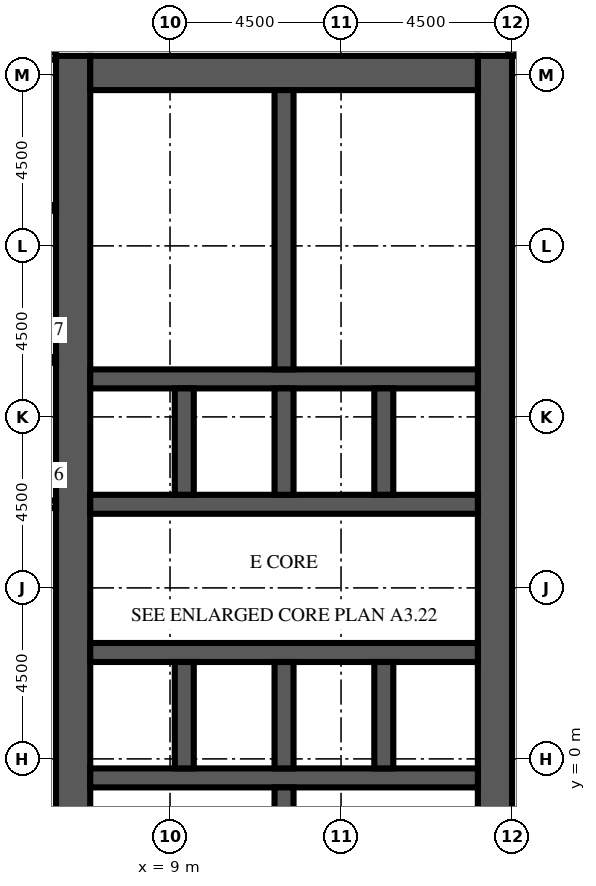
"""IFC4 building model, lengths in metres.
Left out: names, types, materials, properties, quantities, classifications, styles, units other than length and angle.
Written with IfcOpenShell. Run it as: python <this file> out.ifc"""

import sys

from ifc_helpers import new_model, si_unit, direction, frame, frame_2d, origin, place, context, subcontext, project, spatial, rectangle, extrude, element, fill, save


model = new_model("IFC4")
c1 = context("Model", 3, precision=1e-05, world=origin(), true_north=direction((0.0, 1.0)))
c2 = subcontext(c1, "Body", "Model", "MODEL_VIEW")
j1 = project(units=[si_unit("LENGTHUNIT", "METRE"), si_unit("PLANEANGLEUNIT", "RADIAN")], contexts=[c1])
p1 = place(None, origin())
s1 = spatial("IfcSite", under=j1, at=p1, CompositionType="ELEMENT")
p2 = place(p1, origin())
s2 = spatial("IfcBuilding", under=s1, at=p2, CompositionType="ELEMENT")
p3 = place(p2, frame((0.0, 0.0, 141.3)))
s3 = spatial("IfcBuildingStorey", under=s2, at=p3, CompositionType="ELEMENT", Elevation=141.3)
p4 = place(p3, frame((6.45, -9.0, 0.0), z_axis=(0.0, 0.0, 1.0), x_axis=(0.0, 1.0, 0.0)))
e1 = element("IfcWall", 1, at=p4, inside=s3, PredefinedType="SHEAR", context=c2, shape_type="SweptSolid", body=[
    extrude(rectangle(XDim=27.5, YDim=0.9, at=frame_2d((13.75, 0.0))), origin(), (0.0, 0.0, 1.0), 4.1),
])
p5 = place(p4, frame((12.55, 0.0, 0.0)))
e2 = element("IfcOpeningElement", 2, at=p5, cuts=e1, PredefinedType="OPENING", context=c2, shape_type="SweptSolid", body=[
    extrude(rectangle(XDim=2.4, YDim=2.4, at=frame_2d((1.2, 1.2))), frame((0.0, 0.46, 0.0), z_axis=(0.0, -1.0, 0.0), x_axis=(1.0, 0.0, 0.0)), (0.0, 0.0, 1.0), 0.92),
])
p6 = place(p4, frame((5.51, 0.0, 0.0)))
e3 = element("IfcOpeningElement", 3, at=p6, cuts=e1, PredefinedType="OPENING", context=c2, shape_type="SweptSolid", body=[
    extrude(rectangle(XDim=0.923, YDim=2.1, at=frame_2d((0.461, 1.05))), frame((0.0, 0.46, 0.0), z_axis=(0.0, -1.0, 0.0), x_axis=(1.0, 0.0, 0.0)), (0.0, 0.0, 1.0), 0.92),
])
p7 = place(p4, frame((23.427, 0.0, 0.0)))
e4 = element("IfcOpeningElement", 4, at=p7, cuts=e1, PredefinedType="OPENING", context=c2, shape_type="SweptSolid", body=[
    extrude(rectangle(XDim=1.2, YDim=2.1, at=frame_2d((0.6, 1.05))), frame((0.0, 0.46, 0.0), z_axis=(0.0, -1.0, 0.0), x_axis=(1.0, 0.0, 0.0)), (0.0, 0.0, 1.0), 0.92),
])
p8 = place(p3, frame((17.55, -9.0, 0.0), z_axis=(0.0, 0.0, 1.0), x_axis=(0.0, 1.0, 0.0)))
e5 = element("IfcWall", 5, at=p8, inside=s3, PredefinedType="SHEAR", context=c2, shape_type="SweptSolid", body=[
    extrude(rectangle(XDim=27.5, YDim=0.9, at=frame_2d((13.75, 0.0))), origin(), (0.0, 0.0, 1.0), 4.1),
])
p9 = place(p8, frame((12.55, 0.0, 0.0)))
e6 = element("IfcOpeningElement", 6, at=p9, cuts=e5, PredefinedType="OPENING", context=c2, shape_type="SweptSolid", body=[
    extrude(rectangle(XDim=2.4, YDim=2.4, at=frame_2d((1.2, 1.2))), frame((0.0, 0.46, 0.0), z_axis=(0.0, -1.0, 0.0), x_axis=(1.0, 0.0, 0.0)), (0.0, 0.0, 1.0), 0.92),
])
p10 = place(p8, frame((6.825, 0.0, 0.0)))
e7 = element("IfcOpeningElement", 7, at=p10, cuts=e5, PredefinedType="OPENING", context=c2, shape_type="SweptSolid", body=[
    extrude(rectangle(XDim=1.2, YDim=2.1, at=frame_2d((0.6, 1.05))), frame((0.0, 0.46, 0.0), z_axis=(0.0, -1.0, 0.0), x_axis=(1.0, 0.0, 0.0)), (0.0, 0.0, 1.0), 0.92),
])
p11 = place(p8, frame((19.475, 0.0, 0.0)))
e8 = element("IfcOpeningElement", 8, at=p11, cuts=e5, PredefinedType="OPENING", context=c2, shape_type="SweptSolid", body=[
    extrude(rectangle(XDim=1.2, YDim=2.1, at=frame_2d((0.6, 1.05))), frame((0.0, 0.46, 0.0), z_axis=(0.0, -1.0, 0.0), x_axis=(1.0, 0.0, 0.0)), (0.0, 0.0, 1.0), 0.92),
])
p12 = place(p3, frame((6.9, 18.05, 0.0), z_axis=(0.0, 0.0, 1.0), x_axis=(1.0, 0.0, 0.0)))
e9 = element("IfcWall", 9, at=p12, inside=s3, PredefinedType="SHEAR", context=c2, shape_type="SweptSolid", body=[
    extrude(rectangle(XDim=10.2, YDim=0.9, at=frame_2d((5.1, 0.0))), origin(), (0.0, 0.0, 1.0), 4.1),
])
p13 = place(p3, frame((6.9, -0.5, 0.0), z_axis=(0.0, 0.0, 1.0), x_axis=(1.0, 0.0, 0.0)))
e10 = element("IfcWall", 10, at=p13, inside=s3, PredefinedType="SHEAR", context=c2, shape_type="SweptSolid", body=[
    extrude(rectangle(XDim=10.2, YDim=0.5, at=frame_2d((5.1, 0.0))), origin(), (0.0, 0.0, 1.0), 4.1),
])
p14 = place(p3, frame((6.9, 2.8, 0.0), z_axis=(0.0, 0.0, 1.0), x_axis=(1.0, 0.0, 0.0)))
e11 = element("IfcWall", 11, at=p14, inside=s3, PredefinedType="SHEAR", context=c2, shape_type="SweptSolid", body=[
    extrude(rectangle(XDim=10.2, YDim=0.5, at=frame_2d((5.1, 0.0))), origin(), (0.0, 0.0, 1.0), 4.1),
])
p15 = place(p14, frame((0.562, 0.0, 0.0)))
e12 = element("IfcOpeningElement", 12, at=p15, cuts=e11, PredefinedType="OPENING", context=c2, shape_type="SweptSolid", body=[
    extrude(rectangle(XDim=1.1, YDim=2.1, at=frame_2d((0.55, 1.05))), frame((0.0, 0.26, 0.0), z_axis=(0.0, -1.0, 0.0), x_axis=(1.0, 0.0, 0.0)), (0.0, 0.0, 1.0), 0.52),
])
p16 = place(p14, frame((3.238, 0.0, 0.0)))
e13 = element("IfcOpeningElement", 13, at=p16, cuts=e11, PredefinedType="OPENING", context=c2, shape_type="SweptSolid", body=[
    extrude(rectangle(XDim=1.1, YDim=2.1, at=frame_2d((0.55, 1.05))), frame((0.0, 0.26, 0.0), z_axis=(0.0, -1.0, 0.0), x_axis=(1.0, 0.0, 0.0)), (0.0, 0.0, 1.0), 0.52),
])
p17 = place(p14, frame((8.538, 0.0, 0.0)))
e14 = element("IfcOpeningElement", 14, at=p17, cuts=e11, PredefinedType="OPENING", context=c2, shape_type="SweptSolid", body=[
    extrude(rectangle(XDim=1.1, YDim=2.1, at=frame_2d((0.55, 1.05))), frame((0.0, 0.26, 0.0), z_axis=(0.0, -1.0, 0.0), x_axis=(1.0, 0.0, 0.0)), (0.0, 0.0, 1.0), 0.52),
])
p18 = place(p3, frame((6.9, 6.7, 0.0), z_axis=(0.0, 0.0, 1.0), x_axis=(1.0, 0.0, 0.0)))
e15 = element("IfcWall", 15, at=p18, inside=s3, PredefinedType="SHEAR", context=c2, shape_type="SweptSolid", body=[
    extrude(rectangle(XDim=10.2, YDim=0.5, at=frame_2d((5.1, 0.0))), origin(), (0.0, 0.0, 1.0), 4.1),
])
p19 = place(p18, frame((0.562, 0.0, 0.0)))
e16 = element("IfcOpeningElement", 16, at=p19, cuts=e15, PredefinedType="OPENING", context=c2, shape_type="SweptSolid", body=[
    extrude(rectangle(XDim=1.1, YDim=2.1, at=frame_2d((0.55, 1.05))), frame((0.0, 0.26, 0.0), z_axis=(0.0, -1.0, 0.0), x_axis=(1.0, 0.0, 0.0)), (0.0, 0.0, 1.0), 0.52),
])
p20 = place(p18, frame((3.288, 0.0, 0.0)))
e17 = element("IfcOpeningElement", 17, at=p20, cuts=e15, PredefinedType="OPENING", context=c2, shape_type="SweptSolid", body=[
    extrude(rectangle(XDim=1.0, YDim=2.1, at=frame_2d((0.5, 1.05))), frame((0.0, 0.26, 0.0), z_axis=(0.0, -1.0, 0.0), x_axis=(1.0, 0.0, 0.0)), (0.0, 0.0, 1.0), 0.52),
])
p21 = place(p18, frame((5.913, 0.0, 0.0)))
e18 = element("IfcOpeningElement", 18, at=p21, cuts=e15, PredefinedType="OPENING", context=c2, shape_type="SweptSolid", body=[
    extrude(rectangle(XDim=1.0, YDim=2.1, at=frame_2d((0.5, 1.05))), frame((0.0, 0.26, 0.0), z_axis=(0.0, -1.0, 0.0), x_axis=(1.0, 0.0, 0.0)), (0.0, 0.0, 1.0), 0.52),
])
p22 = place(p18, frame((8.587, 0.0, 0.0)))
e19 = element("IfcOpeningElement", 19, at=p22, cuts=e15, PredefinedType="OPENING", context=c2, shape_type="SweptSolid", body=[
    extrude(rectangle(XDim=1.0, YDim=2.1, at=frame_2d((0.5, 1.05))), frame((0.0, 0.26, 0.0), z_axis=(0.0, -1.0, 0.0), x_axis=(1.0, 0.0, 0.0)), (0.0, 0.0, 1.0), 0.52),
])
p23 = place(p3, frame((6.9, 10.0, 0.0), z_axis=(0.0, 0.0, 1.0), x_axis=(1.0, 0.0, 0.0)))
e20 = element("IfcWall", 20, at=p23, inside=s3, PredefinedType="SHEAR", context=c2, shape_type="SweptSolid", body=[
    extrude(rectangle(XDim=10.2, YDim=0.5, at=frame_2d((5.1, 0.0))), origin(), (0.0, 0.0, 1.0), 4.1),
])
for number, where, z_axis, x_axis in (
    (21, (9.375, -0.25, 0.0), (0.0, 0.0, 1.0), (0.0, 1.0, 0.0)),
    (22, (9.375, 6.95, 0.0), (0.0, 0.0, 1.0), (0.0, 1.0, 0.0)),
    (23, (12.0, -0.25, 0.0), (0.0, 0.0, 1.0), (0.0, 1.0, 0.0)),
    (24, (12.0, 6.95, 0.0), (0.0, 0.0, 1.0), (0.0, 1.0, 0.0)),
    (25, (14.625, -0.25, 0.0), (0.0, 0.0, 1.0), (0.0, 1.0, 0.0)),
    (26, (14.625, 6.95, 0.0), (0.0, 0.0, 1.0), (0.0, 1.0, 0.0)),
):
    element("IfcWall", number, at=place(p3, frame(where, z_axis=z_axis, x_axis=x_axis)), inside=s3, PredefinedType="SHEAR", context=c2, shape_type="SweptSolid", body=[
        extrude(rectangle(XDim=2.8, YDim=0.5, at=frame_2d((1.4, 0.0))), origin(), (0.0, 0.0, 1.0), 4.1),
    ])
for number, where, z_axis, x_axis in (
    (27, (12.0, -8.1, 0.0), (0.0, 0.0, 1.0), (0.0, 1.0, 0.0)),
    (28, (12.0, 10.25, 0.0), (0.0, 0.0, 1.0), (0.0, 1.0, 0.0)),
):
    element("IfcWall", number, at=place(p3, frame(where, z_axis=z_axis, x_axis=x_axis)), inside=s3, PredefinedType="SHEAR", context=c2, shape_type="SweptSolid", body=[
        extrude(rectangle(XDim=7.35, YDim=0.5, at=frame_2d((3.675, 0.0))), origin(), (0.0, 0.0, 1.0), 4.1),
    ])
p24 = place(p3, frame((9.325, -2.367, 0.0), z_axis=(0.0, 0.0, 1.0), x_axis=(0.0, 1.0, 0.0)))
e29 = element("IfcWall", 29, at=p24, inside=s3, PredefinedType="PARTITIONING", context=c2, shape_type="SweptSolid", body=[
    extrude(rectangle(XDim=1.617, YDim=0.1, at=frame_2d((0.809, 0.0))), origin(), (0.0, 0.0, 1.0), 3.5),
])
p25 = place(p3, frame((6.9, 12.455, 0.0), z_axis=(0.0, 0.0, 1.0), x_axis=(1.0, 0.0, 0.0)))
e30 = element("IfcWall", 30, at=p25, inside=s3, PredefinedType="PARTITIONING", context=c2, shape_type="SweptSolid", body=[
    extrude(rectangle(XDim=1.3, YDim=0.1, at=frame_2d((0.65, 0.0))), origin(), (0.0, 0.0, 1.0), 3.5),
])
p26 = place(p25, frame((0.2, 0.0, 0.0)))
e31 = element("IfcOpeningElement", 31, at=p26, cuts=e30, PredefinedType="OPENING", context=c2, shape_type="SweptSolid", body=[
    extrude(rectangle(XDim=0.9, YDim=2.1, at=frame_2d((0.45, 1.05))), frame((0.0, 0.06, 0.0), z_axis=(0.0, -1.0, 0.0), x_axis=(1.0, 0.0, 0.0)), (0.0, 0.0, 1.0), 0.12),
])
p27 = place(p3, frame((8.2, 12.455, 0.0), z_axis=(0.0, 0.0, 1.0), x_axis=(1.0, 0.0, 0.0)))
e32 = element("IfcWall", 32, at=p27, inside=s3, PredefinedType="PARTITIONING", context=c2, shape_type="SweptSolid", body=[
    extrude(rectangle(XDim=3.55, YDim=0.1, at=frame_2d((1.775, 0.0))), origin(), (0.0, 0.0, 1.0), 3.5),
])
p28 = place(p3, frame((8.2, 12.455, 0.0), z_axis=(0.0, 0.0, 1.0), x_axis=(0.0, 1.0, 0.0)))
e33 = element("IfcWall", 33, at=p28, inside=s3, PredefinedType="PARTITIONING", context=c2, shape_type="SweptSolid", body=[
    extrude(rectangle(XDim=2.573, YDim=0.1, at=frame_2d((1.286, 0.0))), origin(), (0.0, 0.0, 1.0), 3.5),
])
p29 = place(p28, frame((0.786, 0.0, 0.0)))
e34 = element("IfcOpeningElement", 34, at=p29, cuts=e33, PredefinedType="OPENING", context=c2, shape_type="SweptSolid", body=[
    extrude(rectangle(XDim=1.0, YDim=2.1, at=frame_2d((0.5, 1.05))), frame((0.0, 0.06, 0.0), z_axis=(0.0, -1.0, 0.0), x_axis=(1.0, 0.0, 0.0)), (0.0, 0.0, 1.0), 0.12),
])
p30 = place(p3, frame((8.2, 15.028, 0.0), z_axis=(0.0, 0.0, 1.0), x_axis=(0.0, 1.0, 0.0)))
e35 = element("IfcWall", 35, at=p30, inside=s3, PredefinedType="PARTITIONING", context=c2, shape_type="SweptSolid", body=[
    extrude(rectangle(XDim=2.573, YDim=0.1, at=frame_2d((1.286, 0.0))), origin(), (0.0, 0.0, 1.0), 3.5),
])
p31 = place(p30, frame((0.786, 0.0, 0.0)))
e36 = element("IfcOpeningElement", 36, at=p31, cuts=e35, PredefinedType="OPENING", context=c2, shape_type="SweptSolid", body=[
    extrude(rectangle(XDim=1.0, YDim=2.1, at=frame_2d((0.5, 1.05))), frame((0.0, 0.06, 0.0), z_axis=(0.0, -1.0, 0.0), x_axis=(1.0, 0.0, 0.0)), (0.0, 0.0, 1.0), 0.12),
])
p32 = place(p3, frame((8.2, 15.028, 0.0), z_axis=(0.0, 0.0, 1.0), x_axis=(1.0, 0.0, 0.0)))
e37 = element("IfcWall", 37, at=p32, inside=s3, PredefinedType="PARTITIONING", context=c2, shape_type="SweptSolid", body=[
    extrude(rectangle(XDim=3.55, YDim=0.1, at=frame_2d((1.775, 0.0))), origin(), (0.0, 0.0, 1.0), 3.5),
])
p33 = place(p3, frame((18.0, 18.5, 0.0), z_axis=(0.0, 0.0, 1.0), x_axis=(0.0, 1.0, 0.0)))
e38 = element("IfcWall", 38, at=p33, inside=s3, PredefinedType="PARTITIONING", context=c2, shape_type="SweptSolid", body=[
    extrude(rectangle(XDim=3.3, YDim=0.2, at=frame_2d((1.65, 0.0))), origin(), (0.0, 0.0, 1.0), 3.5),
])
p34 = place(p3, frame((1.5, 6.7, 0.0), z_axis=(0.0, 0.0, 1.0), x_axis=(1.0, 0.0, 0.0)))
e39 = element("IfcWall", 39, at=p34, inside=s3, PredefinedType="PARTITIONING", context=c2, shape_type="SweptSolid", body=[
    extrude(rectangle(XDim=4.5, YDim=0.2, at=frame_2d((2.25, 0.0))), origin(), (0.0, 0.0, 1.0), 3.5),
])
p35 = place(p34, frame((2.35, 0.0, 0.0)))
e40 = element("IfcOpeningElement", 40, at=p35, cuts=e39, PredefinedType="OPENING", context=c2, shape_type="SweptSolid", body=[
    extrude(rectangle(XDim=1.0, YDim=2.1, at=frame_2d((0.5, 1.05))), frame((0.0, 0.11, 0.0), z_axis=(0.0, -1.0, 0.0), x_axis=(1.0, 0.0, 0.0)), (0.0, 0.0, 1.0), 0.22),
])
p36 = place(p3, frame((1.5, 10.5, 0.0), z_axis=(0.0, 0.0, 1.0), x_axis=(1.0, 0.0, 0.0)))
e41 = element("IfcWall", 41, at=p36, inside=s3, PredefinedType="PARTITIONING", context=c2, shape_type="SweptSolid", body=[
    extrude(rectangle(XDim=4.5, YDim=0.15, at=frame_2d((2.25, 0.0))), origin(), (0.0, 0.0, 1.0), 3.5),
])
p37 = place(p36, frame((2.35, 0.0, 0.0)))
e42 = element("IfcOpeningElement", 42, at=p37, cuts=e41, PredefinedType="OPENING", context=c2, shape_type="SweptSolid", body=[
    extrude(rectangle(XDim=1.0, YDim=2.1, at=frame_2d((0.5, 1.05))), frame((0.0, 0.085, 0.0), z_axis=(0.0, -1.0, 0.0), x_axis=(1.0, 0.0, 0.0)), (0.0, 0.0, 1.0), 0.17),
])
p38 = place(p3, frame((1.5, 14.5, 0.0), z_axis=(0.0, 0.0, 1.0), x_axis=(1.0, 0.0, 0.0)))
e43 = element("IfcWall", 43, at=p38, inside=s3, PredefinedType="PARTITIONING", context=c2, shape_type="SweptSolid", body=[
    extrude(rectangle(XDim=4.5, YDim=0.15, at=frame_2d((2.25, 0.0))), origin(), (0.0, 0.0, 1.0), 3.5),
])
p39 = place(p38, frame((1.6, 0.0, 0.0)))
e44 = element("IfcOpeningElement", 44, at=p39, cuts=e43, PredefinedType="OPENING", context=c2, shape_type="SweptSolid", body=[
    extrude(rectangle(XDim=1.0, YDim=2.1, at=frame_2d((0.5, 1.05))), frame((0.0, 0.085, 0.0), z_axis=(0.0, -1.0, 0.0), x_axis=(1.0, 0.0, 0.0)), (0.0, 0.0, 1.0), 0.17),
])
p40 = place(p3, frame((1.5, 18.5, 0.0), z_axis=(0.0, 0.0, 1.0), x_axis=(1.0, 0.0, 0.0)))
e45 = element("IfcWall", 45, at=p40, inside=s3, PredefinedType="PARTITIONING", context=c2, shape_type="SweptSolid", body=[
    extrude(rectangle(XDim=4.5, YDim=0.2, at=frame_2d((2.25, 0.0))), origin(), (0.0, 0.0, 1.0), 3.5),
])
p41 = place(p15, origin())
e46 = element("IfcDoor", 46, at=p41, inside=s3, OperationType="DOUBLE_DOOR_SLIDING", PredefinedType="DOOR", context=c2, shape_type="SweptSolid", body=[
    extrude(rectangle(XDim=1.1, YDim=2.1, at=frame_2d((0.55, 1.05))), frame((0.0, 0.025, 0.0), z_axis=(0.0, -1.0, 0.0), x_axis=(1.0, 0.0, 0.0)), (0.0, 0.0, 1.0), 0.05),
])
fill(e12, e46)
p42 = place(p16, origin())
e47 = element("IfcDoor", 47, at=p42, inside=s3, OperationType="DOUBLE_DOOR_SLIDING", PredefinedType="DOOR", context=c2, shape_type="SweptSolid", body=[
    extrude(rectangle(XDim=1.1, YDim=2.1, at=frame_2d((0.55, 1.05))), frame((0.0, 0.025, 0.0), z_axis=(0.0, -1.0, 0.0), x_axis=(1.0, 0.0, 0.0)), (0.0, 0.0, 1.0), 0.05),
])
fill(e13, e47)
p43 = place(p17, origin())
e48 = element("IfcDoor", 48, at=p43, inside=s3, OperationType="DOUBLE_DOOR_SLIDING", PredefinedType="DOOR", context=c2, shape_type="SweptSolid", body=[
    extrude(rectangle(XDim=1.1, YDim=2.1, at=frame_2d((0.55, 1.05))), frame((0.0, 0.025, 0.0), z_axis=(0.0, -1.0, 0.0), x_axis=(1.0, 0.0, 0.0)), (0.0, 0.0, 1.0), 0.05),
])
fill(e14, e48)
p44 = place(p19, origin())
e49 = element("IfcDoor", 49, at=p44, inside=s3, OperationType="DOUBLE_DOOR_SLIDING", PredefinedType="DOOR", context=c2, shape_type="SweptSolid", body=[
    extrude(rectangle(XDim=1.1, YDim=2.1, at=frame_2d((0.55, 1.05))), frame((0.0, 0.025, 0.0), z_axis=(0.0, -1.0, 0.0), x_axis=(1.0, 0.0, 0.0)), (0.0, 0.0, 1.0), 0.05),
])
fill(e16, e49)
p45 = place(p5, origin())
e50 = element("IfcDoor", 50, at=p45, inside=s3, OperationType="DOUBLE_DOOR_DOUBLE_SWING", PredefinedType="DOOR", context=c2, shape_type="SweptSolid", body=[
    extrude(rectangle(XDim=2.4, YDim=2.4, at=frame_2d((1.2, 1.2))), frame((0.0, 0.025, 0.0), z_axis=(0.0, -1.0, 0.0), x_axis=(1.0, 0.0, 0.0)), (0.0, 0.0, 1.0), 0.05),
])
fill(e2, e50)
p46 = place(p9, origin())
e51 = element("IfcDoor", 51, at=p46, inside=s3, OperationType="DOUBLE_DOOR_DOUBLE_SWING", PredefinedType="DOOR", context=c2, shape_type="SweptSolid", body=[
    extrude(rectangle(XDim=2.4, YDim=2.4, at=frame_2d((1.2, 1.2))), frame((0.0, 0.025, 0.0), z_axis=(0.0, -1.0, 0.0), x_axis=(1.0, 0.0, 0.0)), (0.0, 0.0, 1.0), 0.05),
])
fill(e6, e51)
p47 = place(p10, frame((1.2, 0.0, 0.0), z_axis=(0.0, 0.0, 1.0), x_axis=(-1.0, 0.0, 0.0)))
e52 = element("IfcDoor", 52, at=p47, inside=s3, OperationType="SINGLE_SWING_LEFT", PredefinedType="DOOR", context=c2, shape_type="SweptSolid", body=[
    extrude(rectangle(XDim=1.2, YDim=2.1, at=frame_2d((0.6, 1.05))), frame((0.0, 0.025, 0.0), z_axis=(0.0, -1.0, 0.0), x_axis=(1.0, 0.0, 0.0)), (0.0, 0.0, 1.0), 0.05),
])
fill(e7, e52)
p48 = place(p11, frame((1.2, 0.0, 0.0), z_axis=(0.0, 0.0, 1.0), x_axis=(-1.0, 0.0, 0.0)))
e53 = element("IfcDoor", 53, at=p48, inside=s3, OperationType="SINGLE_SWING_LEFT", PredefinedType="DOOR", context=c2, shape_type="SweptSolid", body=[
    extrude(rectangle(XDim=1.2, YDim=2.1, at=frame_2d((0.6, 1.05))), frame((0.0, 0.025, 0.0), z_axis=(0.0, -1.0, 0.0), x_axis=(1.0, 0.0, 0.0)), (0.0, 0.0, 1.0), 0.05),
])
fill(e8, e53)
p49 = place(p20, origin())
e54 = element("IfcDoor", 54, at=p49, inside=s3, OperationType="SINGLE_SWING_RIGHT", PredefinedType="DOOR", context=c2, shape_type="SweptSolid", body=[
    extrude(rectangle(XDim=1.0, YDim=2.1, at=frame_2d((0.5, 1.05))), frame((0.0, 0.025, 0.0), z_axis=(0.0, -1.0, 0.0), x_axis=(1.0, 0.0, 0.0)), (0.0, 0.0, 1.0), 0.05),
])
fill(e17, e54)
p50 = place(p21, origin())
e55 = element("IfcDoor", 55, at=p50, inside=s3, OperationType="SINGLE_SWING_LEFT", PredefinedType="DOOR", context=c2, shape_type="SweptSolid", body=[
    extrude(rectangle(XDim=1.0, YDim=2.1, at=frame_2d((0.5, 1.05))), frame((0.0, 0.025, 0.0), z_axis=(0.0, -1.0, 0.0), x_axis=(1.0, 0.0, 0.0)), (0.0, 0.0, 1.0), 0.05),
])
fill(e18, e55)
p51 = place(p22, origin())
e56 = element("IfcDoor", 56, at=p51, inside=s3, OperationType="SINGLE_SWING_RIGHT", PredefinedType="DOOR", context=c2, shape_type="SweptSolid", body=[
    extrude(rectangle(XDim=1.0, YDim=2.1, at=frame_2d((0.5, 1.05))), frame((0.0, 0.025, 0.0), z_axis=(0.0, -1.0, 0.0), x_axis=(1.0, 0.0, 0.0)), (0.0, 0.0, 1.0), 0.05),
])
fill(e19, e56)
p52 = place(p26, origin())
e57 = element("IfcDoor", 57, at=p52, inside=s3, OperationType="SINGLE_SWING_RIGHT", PredefinedType="DOOR", context=c2, shape_type="SweptSolid", body=[
    extrude(rectangle(XDim=0.9, YDim=2.1, at=frame_2d((0.45, 1.05))), frame((0.0, 0.025, 0.0), z_axis=(0.0, -1.0, 0.0), x_axis=(1.0, 0.0, 0.0)), (0.0, 0.0, 1.0), 0.05),
])
fill(e31, e57)
p53 = place(p7, origin())
e58 = element("IfcDoor", 58, at=p53, inside=s3, OperationType="SINGLE_SWING_LEFT", PredefinedType="DOOR", context=c2, shape_type="SweptSolid", body=[
    extrude(rectangle(XDim=1.2, YDim=2.1, at=frame_2d((0.6, 1.05))), frame((0.0, -0.375, 0.0), z_axis=(0.0, -1.0, 0.0), x_axis=(1.0, 0.0, 0.0)), (0.0, 0.0, 1.0), 0.05),
])
fill(e4, e58)
p54 = place(p29, origin())
e59 = element("IfcDoor", 59, at=p54, inside=s3, OperationType="SINGLE_SWING_RIGHT", PredefinedType="DOOR", context=c2, shape_type="SweptSolid", body=[
    extrude(rectangle(XDim=1.0, YDim=2.1, at=frame_2d((0.5, 1.05))), frame((0.0, 0.025, 0.0), z_axis=(0.0, -1.0, 0.0), x_axis=(1.0, 0.0, 0.0)), (0.0, 0.0, 1.0), 0.05),
])
fill(e34, e59)
p55 = place(p31, origin())
e60 = element("IfcDoor", 60, at=p55, inside=s3, OperationType="SINGLE_SWING_LEFT", PredefinedType="DOOR", context=c2, shape_type="SweptSolid", body=[
    extrude(rectangle(XDim=1.0, YDim=2.1, at=frame_2d((0.5, 1.05))), frame((0.0, 0.025, 0.0), z_axis=(0.0, -1.0, 0.0), x_axis=(1.0, 0.0, 0.0)), (0.0, 0.0, 1.0), 0.05),
])
fill(e36, e60)
save(model, sys.argv[1])
